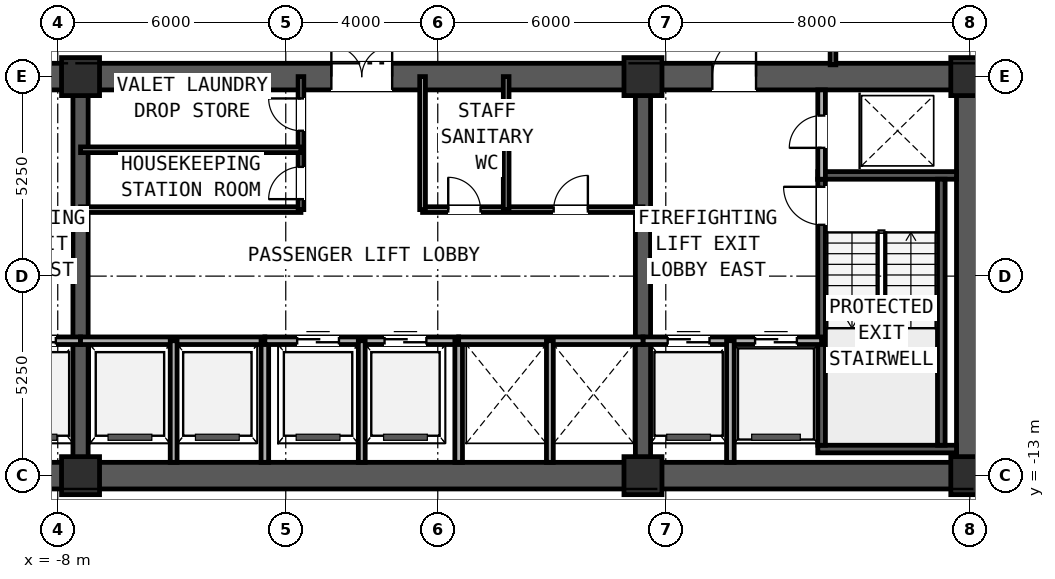
"""IFC4 building model, lengths in metres.
Left out: names, types, materials, properties, quantities, classifications, styles, units other than length and angle.
Written with IfcOpenShell. Run it as: python <this file> out.ifc"""

import sys

from ifc_helpers import new_model, si_unit, direction, frame, frame_2d, origin, origin_2d, place, context, subcontext, project, spatial, rectangle, extrude, element, fill, save


model = new_model("IFC4")
c1 = context("Model", 3, precision=1e-05, world=origin(), true_north=direction((0.0, 1.0)))
c2 = subcontext(c1, "Body", "Model", "MODEL_VIEW")
j1 = project(units=[si_unit("LENGTHUNIT", "METRE"), si_unit("PLANEANGLEUNIT", "RADIAN")], contexts=[c1])
p1 = place(None, origin())
s1 = spatial("IfcSite", under=j1, at=p1, CompositionType="ELEMENT")
p2 = place(p1, origin())
s2 = spatial("IfcBuilding", under=s1, at=p2, CompositionType="ELEMENT")
p3 = place(p2, frame((0.0, 0.0, 106.35)))
s3 = spatial("IfcBuildingStorey", under=s2, at=p3, CompositionType="ELEMENT", Elevation=106.35)
p4 = place(p3, frame((-16.35, -13.0, 0.0), z_axis=(0.0, 0.0, 1.0), x_axis=(1.0, 0.0, 0.0)))
e1 = element("IfcWall", 1, at=p4, inside=s3, PredefinedType="SHEAR", context=c2, shape_type="SweptSolid", body=[
    extrude(rectangle(XDim=32.7, YDim=0.7, at=frame_2d((16.35, 0.0))), origin(), (0.0, 0.0, 1.0), 2.91),
])
p5 = place(p3, frame((-16.35, -2.5, 0.0), z_axis=(0.0, 0.0, 1.0), x_axis=(1.0, 0.0, 0.0)))
e2 = element("IfcWall", 2, at=p5, inside=s3, PredefinedType="SHEAR", context=c2, shape_type="SweptSolid", body=[
    extrude(rectangle(XDim=32.7, YDim=0.7, at=frame_2d((16.35, 0.0))), origin(), (0.0, 0.0, 1.0), 2.91),
])
p6 = place(p5, frame((5.975, 0.0, 0.0)))
e3 = element("IfcOpeningElement", 3, at=p6, cuts=e2, PredefinedType="OPENING", context=c2, shape_type="SweptSolid", body=[
    extrude(rectangle(XDim=1.15, YDim=2.0, at=frame_2d((0.575, 1.0))), frame((0.0, 0.36, 0.0), z_axis=(0.0, -1.0, 0.0), x_axis=(1.0, 0.0, 0.0)), (0.0, 0.0, 1.0), 0.72),
])
p7 = place(p5, frame((15.55, 0.0, 0.0)))
e4 = element("IfcOpeningElement", 4, at=p7, cuts=e2, PredefinedType="OPENING", context=c2, shape_type="SweptSolid", body=[
    extrude(rectangle(XDim=1.6, YDim=2.0, at=frame_2d((0.8, 1.0))), frame((0.0, 0.36, 0.0), z_axis=(0.0, -1.0, 0.0), x_axis=(1.0, 0.0, 0.0)), (0.0, 0.0, 1.0), 0.72),
])
p8 = place(p5, frame((25.575, 0.0, 0.0)))
e5 = element("IfcOpeningElement", 5, at=p8, cuts=e2, PredefinedType="OPENING", context=c2, shape_type="SweptSolid", body=[
    extrude(rectangle(XDim=1.15, YDim=2.0, at=frame_2d((0.575, 1.0))), frame((0.0, 0.36, 0.0), z_axis=(0.0, -1.0, 0.0), x_axis=(1.0, 0.0, 0.0)), (0.0, 0.0, 1.0), 0.72),
])
p9 = place(p3, frame((16.0, -12.65, 0.0), z_axis=(0.0, 0.0, 1.0), x_axis=(0.0, 1.0, 0.0)))
e6 = element("IfcWall", 6, at=p9, inside=s3, PredefinedType="SHEAR", context=c2, shape_type="SweptSolid", body=[
    extrude(rectangle(XDim=9.8, YDim=0.7, at=frame_2d((4.9, 0.0))), origin(), (0.0, 0.0, 1.0), 2.91),
])
for number, where, z_axis, x_axis in (
    (7, (-7.4, -12.65, 0.0), (0.0, 0.0, 1.0), (0.0, 1.0, 0.0)),
    (8, (7.4, -12.65, 0.0), (0.0, 0.0, 1.0), (0.0, 1.0, 0.0)),
):
    element("IfcWall", number, at=place(p3, frame(where, z_axis=z_axis, x_axis=x_axis)), inside=s3, PredefinedType="SHEAR", context=c2, shape_type="SweptSolid", body=[
        extrude(rectangle(XDim=9.8, YDim=0.4, at=frame_2d((4.9, 0.0))), origin(), (0.0, 0.0, 1.0), 3.19),
    ])
for number, where, z_axis, x_axis in (
    (9, (12.0, -12.3, 0.0), (0.0, 0.0, 1.0), (1.0, 0.0, 0.0)),
    (10, (12.0, -5.1, 0.0), (0.0, 0.0, 1.0), (1.0, 0.0, 0.0)),
):
    element("IfcWall", number, at=place(p3, frame(where, z_axis=z_axis, x_axis=x_axis)), inside=s3, PredefinedType="SOLIDWALL", context=c2, shape_type="SweptSolid", body=[
        extrude(rectangle(XDim=3.65, YDim=0.2, at=frame_2d((1.825, 0.0))), origin(), (0.0, 0.0, 1.0), 3.19),
    ])
p10 = place(p3, frame((12.1, -12.2, 0.0), z_axis=(0.0, 0.0, 1.0), x_axis=(0.0, 1.0, 0.0)))
e11 = element("IfcWall", 11, at=p10, inside=s3, PredefinedType="SOLIDWALL", context=c2, shape_type="SweptSolid", body=[
    extrude(rectangle(XDim=7.0, YDim=0.2, at=frame_2d((3.5, 0.0))), origin(), (0.0, 0.0, 1.0), 3.19),
])
p11 = place(p10, frame((5.8, 0.0, 0.0)))
e12 = element("IfcOpeningElement", 12, at=p11, cuts=e11, PredefinedType="OPENING", context=c2, shape_type="SweptSolid", body=[
    extrude(rectangle(XDim=1.0, YDim=2.1, at=frame_2d((0.5, 1.05))), frame((0.0, 0.11, 0.0), z_axis=(0.0, -1.0, 0.0), x_axis=(1.0, 0.0, 0.0)), (0.0, 0.0, 1.0), 0.22),
])
p12 = place(p3, frame((15.25, -12.2, 0.0), z_axis=(0.0, 0.0, 1.0), x_axis=(0.0, 1.0, 0.0)))
e13 = element("IfcWall", 13, at=p12, inside=s3, PredefinedType="SOLIDWALL", context=c2, shape_type="SweptSolid", body=[
    extrude(rectangle(XDim=7.0, YDim=0.2, at=frame_2d((3.5, 0.0))), origin(), (0.0, 0.0, 1.0), 3.19),
])
for number, where, z_axis, x_axis in (
    (14, (-7.4, -13.0, 0.0), (0.0, 0.0, 1.0), (1.0, 0.0, 0.0)),
    (15, (7.4, -13.0, 0.0), (0.0, 0.0, 1.0), (1.0, 0.0, 0.0)),
    (16, (16.0, -13.0, 0.0), (0.0, 0.0, 1.0), (1.0, 0.0, 0.0)),
    (17, (-7.4, -2.5, 0.0), (0.0, 0.0, 1.0), (1.0, 0.0, 0.0)),
    (18, (7.4, -2.5, 0.0), (0.0, 0.0, 1.0), (1.0, 0.0, 0.0)),
    (19, (16.0, -2.5, 0.0), (0.0, 0.0, 1.0), (1.0, 0.0, 0.0)),
):
    element("IfcColumn", number, at=place(p3, frame(where, z_axis=z_axis, x_axis=x_axis)), inside=s3, PredefinedType="COLUMN", context=c2, shape_type="SweptSolid", body=[
        extrude(rectangle(XDim=1.0, YDim=1.0, at=origin_2d()), origin(), (0.0, 0.0, 1.0), 3.45),
    ])
p13 = place(p3, frame((12.1, -5.2, 0.0), z_axis=(0.0, 0.0, 1.0), x_axis=(0.0, 1.0, 0.0)))
e20 = element("IfcWall", 20, at=p13, inside=s3, PredefinedType="PARTITIONING", context=c2, shape_type="SweptSolid", body=[
    extrude(rectangle(XDim=2.35, YDim=0.2, at=frame_2d((1.175, 0.0))), origin(), (0.0, 0.0, 1.0), 2.225),
])
p14 = place(p13, frame((0.825, 0.0, 0.0)))
e21 = element("IfcOpeningElement", 21, at=p14, cuts=e20, PredefinedType="OPENING", context=c2, shape_type="SweptSolid", body=[
    extrude(rectangle(XDim=0.85, YDim=2.05, at=frame_2d((0.425, 1.025))), frame((0.0, 0.11, 0.0), z_axis=(0.0, -1.0, 0.0), x_axis=(1.0, 0.0, 0.0)), (0.0, 0.0, 1.0), 0.22),
])
p15 = place(p3, frame((-12.1, -9.45, 0.0), z_axis=(0.0, 0.0, 1.0), x_axis=(1.0, 0.0, 0.0)))
e22 = element("IfcWall", 22, at=p15, inside=s3, PredefinedType="PARTITIONING", context=c2, shape_type="SweptSolid", body=[
    extrude(rectangle(XDim=4.7, YDim=0.2, at=frame_2d((2.35, 0.0))), origin(), (0.0, 0.0, 1.0), 3.19),
])
p16 = place(p15, frame((0.65, 0.0, 0.0)))
e23 = element("IfcOpeningElement", 23, at=p16, cuts=e22, PredefinedType="OPENING", context=c2, shape_type="SweptSolid", body=[
    extrude(rectangle(XDim=1.1, YDim=2.2, at=frame_2d((0.55, 1.1))), frame((0.0, 0.11, 0.0), z_axis=(0.0, -1.0, 0.0), x_axis=(1.0, 0.0, 0.0)), (0.0, 0.0, 1.0), 0.22),
])
p17 = place(p15, frame((2.95, 0.0, 0.0)))
e24 = element("IfcOpeningElement", 24, at=p17, cuts=e22, PredefinedType="OPENING", context=c2, shape_type="SweptSolid", body=[
    extrude(rectangle(XDim=1.1, YDim=2.2, at=frame_2d((0.55, 1.1))), frame((0.0, 0.11, 0.0), z_axis=(0.0, -1.0, 0.0), x_axis=(1.0, 0.0, 0.0)), (0.0, 0.0, 1.0), 0.22),
])
p18 = place(p3, frame((7.4, -9.45, 0.0), z_axis=(0.0, 0.0, 1.0), x_axis=(1.0, 0.0, 0.0)))
e25 = element("IfcWall", 25, at=p18, inside=s3, PredefinedType="PARTITIONING", context=c2, shape_type="SweptSolid", body=[
    extrude(rectangle(XDim=4.7, YDim=0.2, at=frame_2d((2.35, 0.0))), origin(), (0.0, 0.0, 1.0), 3.19),
])
p19 = place(p18, frame((2.95, 0.0, 0.0)))
e26 = element("IfcOpeningElement", 26, at=p19, cuts=e25, PredefinedType="OPENING", context=c2, shape_type="SweptSolid", body=[
    extrude(rectangle(XDim=1.1, YDim=2.2, at=frame_2d((0.55, 1.1))), frame((0.0, 0.11, 0.0), z_axis=(0.0, -1.0, 0.0), x_axis=(1.0, 0.0, 0.0)), (0.0, 0.0, 1.0), 0.22),
])
p20 = place(p18, frame((0.65, 0.0, 0.0)))
e27 = element("IfcOpeningElement", 27, at=p20, cuts=e25, PredefinedType="OPENING", context=c2, shape_type="SweptSolid", body=[
    extrude(rectangle(XDim=1.1, YDim=2.2, at=frame_2d((0.55, 1.1))), frame((0.0, 0.11, 0.0), z_axis=(0.0, -1.0, 0.0), x_axis=(1.0, 0.0, 0.0)), (0.0, 0.0, 1.0), 0.22),
])
p21 = place(p3, frame((9.7, -12.65, 0.0), z_axis=(0.0, 0.0, 1.0), x_axis=(0.0, 1.0, 0.0)))
e28 = element("IfcWall", 28, at=p21, inside=s3, PredefinedType="PARTITIONING", context=c2, shape_type="SweptSolid", body=[
    extrude(rectangle(XDim=3.2, YDim=0.2, at=frame_2d((1.6, 0.0))), origin(), (0.0, 0.0, 1.0), 2.225),
])
p22 = place(p3, frame((-7.4, -9.45, 0.0), z_axis=(0.0, 0.0, 1.0), x_axis=(1.0, 0.0, 0.0)))
e29 = element("IfcWall", 29, at=p22, inside=s3, PredefinedType="PARTITIONING", context=c2, shape_type="SweptSolid", body=[
    extrude(rectangle(XDim=4.85, YDim=0.2, at=frame_2d((2.425, 0.0))), origin(), (0.0, 0.0, 1.0), 3.19),
])
p23 = place(p3, frame((-4.95, -12.65, 0.0), z_axis=(0.0, 0.0, 1.0), x_axis=(0.0, 1.0, 0.0)))
e30 = element("IfcWall", 30, at=p23, inside=s3, PredefinedType="PARTITIONING", context=c2, shape_type="SweptSolid", body=[
    extrude(rectangle(XDim=3.2, YDim=0.18, at=frame_2d((1.6, 0.0))), origin(), (0.0, 0.0, 1.0), 2.225),
])
p24 = place(p3, frame((-2.55, -12.65, 0.0), z_axis=(0.0, 0.0, 1.0), x_axis=(0.0, 1.0, 0.0)))
e31 = element("IfcWall", 31, at=p24, inside=s3, PredefinedType="PARTITIONING", context=c2, shape_type="SweptSolid", body=[
    extrude(rectangle(XDim=3.2, YDim=0.2, at=frame_2d((1.6, 0.0))), origin(), (0.0, 0.0, 1.0), 2.225),
])
p25 = place(p3, frame((-2.55, -9.45, 0.0), z_axis=(0.0, 0.0, 1.0), x_axis=(1.0, 0.0, 0.0)))
e32 = element("IfcWall", 32, at=p25, inside=s3, PredefinedType="PARTITIONING", context=c2, shape_type="SweptSolid", body=[
    extrude(rectangle(XDim=5.1, YDim=0.2, at=frame_2d((2.55, 0.0))), origin(), (0.0, 0.0, 1.0), 3.19),
])
p26 = place(p25, frame((0.85, 0.0, 0.0)))
e33 = element("IfcOpeningElement", 33, at=p26, cuts=e32, PredefinedType="OPENING", context=c2, shape_type="SweptSolid", body=[
    extrude(rectangle(XDim=1.1, YDim=2.2, at=frame_2d((0.55, 1.1))), frame((0.0, 0.11, 0.0), z_axis=(0.0, -1.0, 0.0), x_axis=(1.0, 0.0, 0.0)), (0.0, 0.0, 1.0), 0.22),
])
p27 = place(p25, frame((3.15, 0.0, 0.0)))
e34 = element("IfcOpeningElement", 34, at=p27, cuts=e32, PredefinedType="OPENING", context=c2, shape_type="SweptSolid", body=[
    extrude(rectangle(XDim=1.1, YDim=2.2, at=frame_2d((0.55, 1.1))), frame((0.0, 0.11, 0.0), z_axis=(0.0, -1.0, 0.0), x_axis=(1.0, 0.0, 0.0)), (0.0, 0.0, 1.0), 0.22),
])
p28 = place(p3, frame((0.0, -12.65, 0.0), z_axis=(0.0, 0.0, 1.0), x_axis=(0.0, 1.0, 0.0)))
e35 = element("IfcWall", 35, at=p28, inside=s3, PredefinedType="PARTITIONING", context=c2, shape_type="SweptSolid", body=[
    extrude(rectangle(XDim=3.2, YDim=0.18, at=frame_2d((1.6, 0.0))), origin(), (0.0, 0.0, 1.0), 2.225),
])
p29 = place(p3, frame((2.55, -12.65, 0.0), z_axis=(0.0, 0.0, 1.0), x_axis=(0.0, 1.0, 0.0)))
e36 = element("IfcWall", 36, at=p29, inside=s3, PredefinedType="PARTITIONING", context=c2, shape_type="SweptSolid", body=[
    extrude(rectangle(XDim=3.2, YDim=0.2, at=frame_2d((1.6, 0.0))), origin(), (0.0, 0.0, 1.0), 2.225),
])
p30 = place(p3, frame((2.55, -9.45, 0.0), z_axis=(0.0, 0.0, 1.0), x_axis=(1.0, 0.0, 0.0)))
e37 = element("IfcWall", 37, at=p30, inside=s3, PredefinedType="PARTITIONING", context=c2, shape_type="SweptSolid", body=[
    extrude(rectangle(XDim=4.85, YDim=0.2, at=frame_2d((2.425, 0.0))), origin(), (0.0, 0.0, 1.0), 3.19),
])
p31 = place(p3, frame((4.95, -12.65, 0.0), z_axis=(0.0, 0.0, 1.0), x_axis=(0.0, 1.0, 0.0)))
e38 = element("IfcWall", 38, at=p31, inside=s3, PredefinedType="PARTITIONING", context=c2, shape_type="SweptSolid", body=[
    extrude(rectangle(XDim=3.2, YDim=0.18, at=frame_2d((1.6, 0.0))), origin(), (0.0, 0.0, 1.0), 2.225),
])
p32 = place(p3, frame((-7.4, -6.0, 0.0), z_axis=(0.0, 0.0, 1.0), x_axis=(1.0, 0.0, 0.0)))
e39 = element("IfcWall", 39, at=p32, inside=s3, PredefinedType="PARTITIONING", context=c2, shape_type="SweptSolid", body=[
    extrude(rectangle(XDim=5.8, YDim=0.15, at=frame_2d((2.9, 0.0))), origin(), (0.0, 0.0, 1.0), 3.19),
])
p33 = place(p3, frame((-1.6, -6.0, 0.0), z_axis=(0.0, 0.0, 1.0), x_axis=(0.0, 1.0, 0.0)))
e40 = element("IfcWall", 40, at=p33, inside=s3, PredefinedType="PARTITIONING", context=c2, shape_type="SweptSolid", body=[
    extrude(rectangle(XDim=3.5, YDim=0.15, at=frame_2d((1.75, 0.0))), origin(), (0.0, 0.0, 1.0), 2.225),
])
p34 = place(p33, frame((0.275, 0.0, 0.0)))
e41 = element("IfcOpeningElement", 41, at=p34, cuts=e40, PredefinedType="OPENING", context=c2, shape_type="SweptSolid", body=[
    extrude(rectangle(XDim=0.85, YDim=2.05, at=frame_2d((0.425, 1.025))), frame((0.0, 0.085, 0.0), z_axis=(0.0, -1.0, 0.0), x_axis=(1.0, 0.0, 0.0)), (0.0, 0.0, 1.0), 0.17),
])
p35 = place(p33, frame((2.075, 0.0, 0.0)))
e42 = element("IfcOpeningElement", 42, at=p35, cuts=e40, PredefinedType="OPENING", context=c2, shape_type="SweptSolid", body=[
    extrude(rectangle(XDim=0.85, YDim=2.05, at=frame_2d((0.425, 1.025))), frame((0.0, 0.085, 0.0), z_axis=(0.0, -1.0, 0.0), x_axis=(1.0, 0.0, 0.0)), (0.0, 0.0, 1.0), 0.17),
])
p36 = place(p3, frame((1.6, -6.0, 0.0), z_axis=(0.0, 0.0, 1.0), x_axis=(1.0, 0.0, 0.0)))
e43 = element("IfcWall", 43, at=p36, inside=s3, PredefinedType="PARTITIONING", context=c2, shape_type="SweptSolid", body=[
    extrude(rectangle(XDim=5.8, YDim=0.15, at=frame_2d((2.9, 0.0))), origin(), (0.0, 0.0, 1.0), 3.19),
])
p37 = place(p36, frame((0.675, 0.0, 0.0)))
e44 = element("IfcOpeningElement", 44, at=p37, cuts=e43, PredefinedType="OPENING", context=c2, shape_type="SweptSolid", body=[
    extrude(rectangle(XDim=0.85, YDim=2.05, at=frame_2d((0.425, 1.025))), frame((0.0, 0.085, 0.0), z_axis=(0.0, -1.0, 0.0), x_axis=(1.0, 0.0, 0.0)), (0.0, 0.0, 1.0), 0.17),
])
p38 = place(p36, frame((3.45, 0.0, 0.0)))
e45 = element("IfcOpeningElement", 45, at=p38, cuts=e43, PredefinedType="OPENING", context=c2, shape_type="SweptSolid", body=[
    extrude(rectangle(XDim=0.9, YDim=2.1, at=frame_2d((0.45, 1.05))), frame((0.0, 0.085, 0.0), z_axis=(0.0, -1.0, 0.0), x_axis=(1.0, 0.0, 0.0)), (0.0, 0.0, 1.0), 0.17),
])
p39 = place(p3, frame((1.6, -6.0, 0.0), z_axis=(0.0, 0.0, 1.0), x_axis=(0.0, 1.0, 0.0)))
e46 = element("IfcWall", 46, at=p39, inside=s3, PredefinedType="PARTITIONING", context=c2, shape_type="SweptSolid", body=[
    extrude(rectangle(XDim=3.5, YDim=0.15, at=frame_2d((1.75, 0.0))), origin(), (0.0, 0.0, 1.0), 2.225),
])
p40 = place(p3, frame((-7.4, -4.425, 0.0), z_axis=(0.0, 0.0, 1.0), x_axis=(1.0, 0.0, 0.0)))
e47 = element("IfcWall", 47, at=p40, inside=s3, PredefinedType="PARTITIONING", context=c2, shape_type="SweptSolid", body=[
    extrude(rectangle(XDim=5.8, YDim=0.15, at=frame_2d((2.9, 0.0))), origin(), (0.0, 0.0, 1.0), 3.19),
])
p41 = place(p3, frame((3.8, -6.0, 0.0), z_axis=(0.0, 0.0, 1.0), x_axis=(0.0, 1.0, 0.0)))
e48 = element("IfcWall", 48, at=p41, inside=s3, PredefinedType="PARTITIONING", context=c2, shape_type="SweptSolid", body=[
    extrude(rectangle(XDim=3.5, YDim=0.15, at=frame_2d((1.75, 0.0))), origin(), (0.0, 0.0, 1.0), 2.225),
])
p42 = place(p3, frame((12.4, 0.59, 0.0), z_axis=(0.0, 0.0, 1.0), x_axis=(0.0, -1.0, 0.0)))
e49 = element("IfcWall", 49, at=p42, inside=s3, PredefinedType="PARTITIONING", context=c2, shape_type="SweptSolid", body=[
    extrude(rectangle(XDim=2.78, YDim=0.15, at=frame_2d((1.39, 0.0))), origin(), (0.0, 0.0, 1.0), 2.225),
])
p43 = place(p11, origin())
e50 = element("IfcDoor", 50, at=p43, inside=s3, OperationType="SINGLE_SWING_RIGHT", PredefinedType="DOOR", context=c2, shape_type="SweptSolid", body=[
    extrude(rectangle(XDim=1.0, YDim=2.1, at=frame_2d((0.5, 1.05))), frame((0.0, 0.025, 0.0), z_axis=(0.0, -1.0, 0.0), x_axis=(1.0, 0.0, 0.0)), (0.0, 0.0, 1.0), 0.05),
])
fill(e12, e50)
p44 = place(p14, frame((0.85, 0.0, 0.0), z_axis=(0.0, 0.0, 1.0), x_axis=(-1.0, 0.0, 0.0)))
e51 = element("IfcDoor", 51, at=p44, inside=s3, OperationType="SINGLE_SWING_LEFT", PredefinedType="DOOR", context=c2, shape_type="SweptSolid", body=[
    extrude(rectangle(XDim=0.85, YDim=2.05, at=frame_2d((0.425, 1.025))), frame((0.0, 0.025, 0.0), z_axis=(0.0, -1.0, 0.0), x_axis=(1.0, 0.0, 0.0)), (0.0, 0.0, 1.0), 0.05),
])
fill(e21, e51)
p45 = place(p17, origin())
e52 = element("IfcDoor", 52, at=p45, inside=s3, OperationType="SLIDING_TO_RIGHT", PredefinedType="DOOR", context=c2, shape_type="SweptSolid", body=[
    extrude(rectangle(XDim=1.1, YDim=2.2, at=frame_2d((0.55, 1.1))), frame((0.0, 0.025, 0.0), z_axis=(0.0, -1.0, 0.0), x_axis=(1.0, 0.0, 0.0)), (0.0, 0.0, 1.0), 0.05),
])
fill(e24, e52)
p46 = place(p19, origin())
e53 = element("IfcDoor", 53, at=p46, inside=s3, OperationType="SLIDING_TO_LEFT", PredefinedType="DOOR", context=c2, shape_type="SweptSolid", body=[
    extrude(rectangle(XDim=1.1, YDim=2.2, at=frame_2d((0.55, 1.1))), frame((0.0, 0.025, 0.0), z_axis=(0.0, -1.0, 0.0), x_axis=(1.0, 0.0, 0.0)), (0.0, 0.0, 1.0), 0.05),
])
fill(e26, e53)
p47 = place(p20, origin())
e54 = element("IfcDoor", 54, at=p47, inside=s3, OperationType="SLIDING_TO_RIGHT", PredefinedType="DOOR", context=c2, shape_type="SweptSolid", body=[
    extrude(rectangle(XDim=1.1, YDim=2.2, at=frame_2d((0.55, 1.1))), frame((0.0, 0.025, 0.0), z_axis=(0.0, -1.0, 0.0), x_axis=(1.0, 0.0, 0.0)), (0.0, 0.0, 1.0), 0.05),
])
fill(e27, e54)
p48 = place(p7, origin())
e55 = element("IfcDoor", 55, at=p48, inside=s3, OperationType="DOUBLE_DOOR_SINGLE_SWING", PredefinedType="DOOR", context=c2, shape_type="SweptSolid", body=[
    extrude(rectangle(XDim=1.6, YDim=2.0, at=frame_2d((0.8, 1.0))), frame((0.0, 0.025, 0.0), z_axis=(0.0, -1.0, 0.0), x_axis=(1.0, 0.0, 0.0)), (0.0, 0.0, 1.0), 0.05),
])
fill(e4, e55)
p49 = place(p8, origin())
e56 = element("IfcDoor", 56, at=p49, inside=s3, OperationType="SINGLE_SWING_RIGHT", PredefinedType="DOOR", context=c2, shape_type="SweptSolid", body=[
    extrude(rectangle(XDim=1.15, YDim=2.0, at=frame_2d((0.575, 1.0))), frame((0.0, 0.025, 0.0), z_axis=(0.0, -1.0, 0.0), x_axis=(1.0, 0.0, 0.0)), (0.0, 0.0, 1.0), 0.05),
])
fill(e5, e56)
p50 = place(p26, origin())
e57 = element("IfcDoor", 57, at=p50, inside=s3, OperationType="SLIDING_TO_RIGHT", PredefinedType="DOOR", context=c2, shape_type="SweptSolid", body=[
    extrude(rectangle(XDim=1.1, YDim=2.2, at=frame_2d((0.55, 1.1))), frame((0.0, 0.025, 0.0), z_axis=(0.0, -1.0, 0.0), x_axis=(1.0, 0.0, 0.0)), (0.0, 0.0, 1.0), 0.05),
])
fill(e33, e57)
p51 = place(p27, origin())
e58 = element("IfcDoor", 58, at=p51, inside=s3, OperationType="SLIDING_TO_RIGHT", PredefinedType="DOOR", context=c2, shape_type="SweptSolid", body=[
    extrude(rectangle(XDim=1.1, YDim=2.2, at=frame_2d((0.55, 1.1))), frame((0.0, 0.025, 0.0), z_axis=(0.0, -1.0, 0.0), x_axis=(1.0, 0.0, 0.0)), (0.0, 0.0, 1.0), 0.05),
])
fill(e34, e58)
p52 = place(p34, origin())
e59 = element("IfcDoor", 59, at=p52, inside=s3, OperationType="SINGLE_SWING_LEFT", PredefinedType="DOOR", context=c2, shape_type="SweptSolid", body=[
    extrude(rectangle(XDim=0.85, YDim=2.05, at=frame_2d((0.425, 1.025))), frame((0.0, 0.025, 0.0), z_axis=(0.0, -1.0, 0.0), x_axis=(1.0, 0.0, 0.0)), (0.0, 0.0, 1.0), 0.05),
])
fill(e41, e59)
p53 = place(p35, origin())
e60 = element("IfcDoor", 60, at=p53, inside=s3, OperationType="SINGLE_SWING_RIGHT", PredefinedType="DOOR", context=c2, shape_type="SweptSolid", body=[
    extrude(rectangle(XDim=0.85, YDim=2.05, at=frame_2d((0.425, 1.025))), frame((0.0, 0.025, 0.0), z_axis=(0.0, -1.0, 0.0), x_axis=(1.0, 0.0, 0.0)), (0.0, 0.0, 1.0), 0.05),
])
fill(e42, e60)
p54 = place(p37, frame((0.85, 0.0, 0.0), z_axis=(0.0, 0.0, 1.0), x_axis=(-1.0, 0.0, 0.0)))
e61 = element("IfcDoor", 61, at=p54, inside=s3, OperationType="SINGLE_SWING_LEFT", PredefinedType="DOOR", context=c2, shape_type="SweptSolid", body=[
    extrude(rectangle(XDim=0.85, YDim=2.05, at=frame_2d((0.425, 1.025))), frame((0.0, 0.025, 0.0), z_axis=(0.0, -1.0, 0.0), x_axis=(1.0, 0.0, 0.0)), (0.0, 0.0, 1.0), 0.05),
])
fill(e44, e61)
p55 = place(p38, frame((0.9, 0.0, 0.0), z_axis=(0.0, 0.0, 1.0), x_axis=(-1.0, 0.0, 0.0)))
e62 = element("IfcDoor", 62, at=p55, inside=s3, OperationType="SINGLE_SWING_RIGHT", PredefinedType="DOOR", context=c2, shape_type="SweptSolid", body=[
    extrude(rectangle(XDim=0.9, YDim=2.1, at=frame_2d((0.45, 1.05))), frame((0.0, 0.025, 0.0), z_axis=(0.0, -1.0, 0.0), x_axis=(1.0, 0.0, 0.0)), (0.0, 0.0, 1.0), 0.05),
])
fill(e45, e62)
save(model, sys.argv[1])
